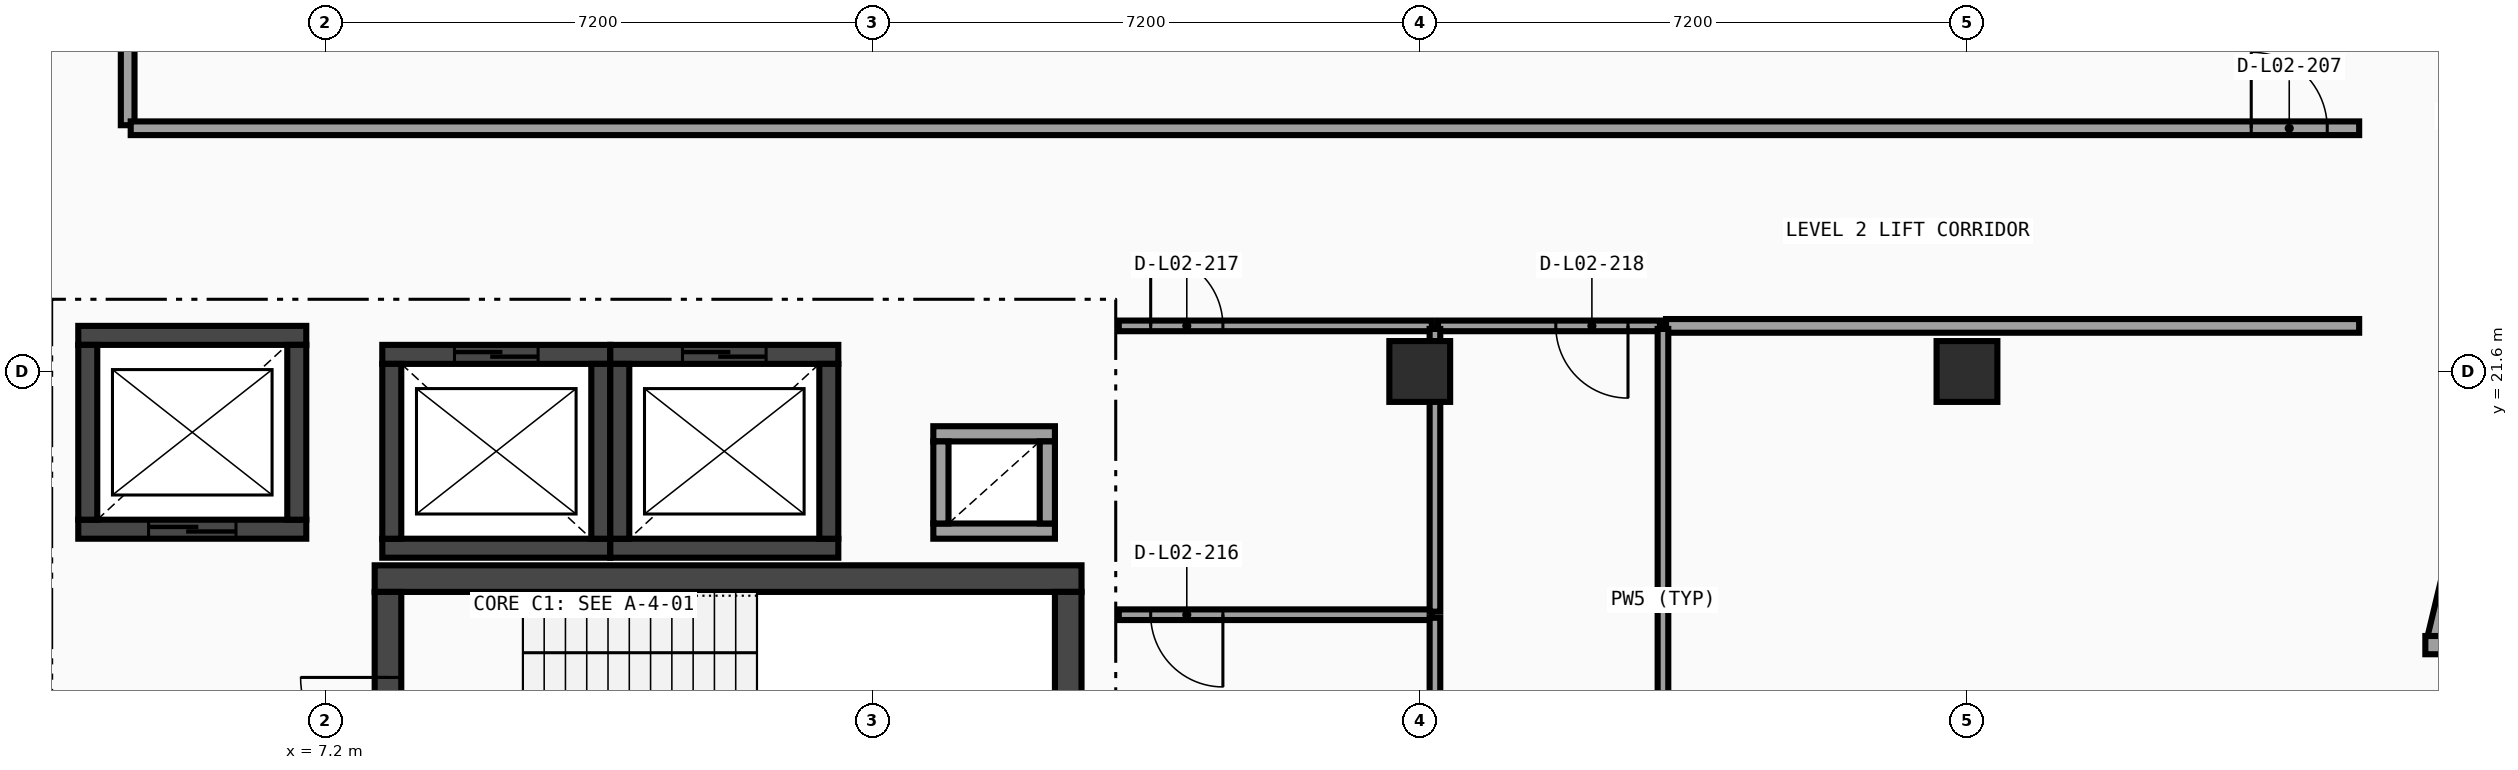
"""IFC4 building model, lengths in metres.
Left out: names, types, materials, properties, quantities, classifications, styles, units other than length and angle.
Written with IfcOpenShell. Run it as: python <this file> out.ifc"""

import sys

from ifc_helpers import new_model, si_unit, direction, frame, frame_2d, origin, origin_2d, place, context, subcontext, project, spatial, rectangle, extrude, element, fill, save


model = new_model("IFC4")
c1 = context("Model", 3, precision=1e-05, world=origin(), true_north=direction((0.0, 1.0)))
c2 = subcontext(c1, "Body", "Model", "MODEL_VIEW")
j1 = project(units=[si_unit("LENGTHUNIT", "METRE"), si_unit("PLANEANGLEUNIT", "RADIAN")], contexts=[c1])
p1 = place(None, origin())
s1 = spatial("IfcSite", under=j1, at=p1, CompositionType="ELEMENT")
p2 = place(p1, origin())
s2 = spatial("IfcBuilding", under=s1, at=p2, CompositionType="ELEMENT")
p3 = place(p2, frame((0.0, 0.0, 10.2)))
s3 = spatial("IfcBuildingStorey", under=s2, at=p3, CompositionType="ELEMENT", Elevation=10.2)
for number, where, z_axis, x_axis in (
    (1, (21.6, 21.6, 0.0), (0.0, 0.0, 1.0), (1.0, 0.0, 0.0)),
    (2, (28.8, 21.6, 0.0), (0.0, 0.0, 1.0), (1.0, 0.0, 0.0)),
):
    element("IfcColumn", number, at=place(p3, frame(where, z_axis=z_axis, x_axis=x_axis)), inside=s3, PredefinedType="COLUMN", context=c2, shape_type="SweptSolid", body=[
        extrude(rectangle(XDim=0.8, YDim=0.8, at=origin_2d()), origin(), (0.0, 0.0, 1.0), 4.5),
    ])
p4 = place(p3, frame((35.84, 21.6, 0.0), z_axis=(0.0, 0.0, 1.0), x_axis=(-0.233480453725, -0.972361495396, 0.0)))
e3 = element("IfcWall", 3, at=p4, inside=s3, PredefinedType="SOLIDWALL", context=c2, shape_type="SweptSolid", body=[
    extrude(rectangle(XDim=3.607, YDim=0.28, at=frame_2d((1.804, 0.0))), origin(), (0.0, 0.0, 1.0), 4.24),
])
p5 = place(p4, frame((0.954, 0.0, 0.8)))
e4 = element("IfcOpeningElement", 4, at=p5, cuts=e3, PredefinedType="OPENING", context=c2, shape_type="SweptSolid", body=[
    extrude(rectangle(XDim=1.7, YDim=1.85, at=frame_2d((0.85, 0.925))), frame((0.0, 0.15, 0.0), z_axis=(0.0, -1.0, 0.0), x_axis=(1.0, 0.0, 0.0)), (0.0, 0.0, 1.0), 0.3),
])
p6 = place(p3, frame((34.831, 18.0, 0.0), z_axis=(0.0, 0.0, 1.0), x_axis=(1.0, 0.0, 0.0)))
e5 = element("IfcWall", 5, at=p6, inside=s3, PredefinedType="SOLIDWALL", context=c2, shape_type="SweptSolid", body=[
    extrude(rectangle(XDim=0.877, YDim=0.24, at=frame_2d((0.438, 0.0))), origin(), (0.0, 0.0, 1.0), 4.24),
])
p7 = place(p3, frame((35.84, 18.0, 0.0), z_axis=(0.0, 0.0, 1.0), x_axis=(-0.233495818898, -0.972357805829, 0.0)))
e6 = element("IfcWall", 6, at=p7, inside=s3, PredefinedType="SOLIDWALL", context=c2, shape_type="SweptSolid", body=[
    extrude(rectangle(XDim=3.607, YDim=0.28, at=frame_2d((1.804, 0.0))), origin(), (0.0, 0.0, 1.0), 4.24),
])
p8 = place(p7, frame((0.954, 0.0, 0.8)))
e7 = element("IfcOpeningElement", 7, at=p8, cuts=e6, PredefinedType="OPENING", context=c2, shape_type="SweptSolid", body=[
    extrude(rectangle(XDim=1.7, YDim=1.85, at=frame_2d((0.85, 0.925))), frame((0.0, 0.15, 0.0), z_axis=(0.0, -1.0, 0.0), x_axis=(1.0, 0.0, 0.0)), (0.0, 0.0, 1.0), 0.3),
])
p9 = place(p3, frame((17.15, 18.875, 0.0), z_axis=(0.0, 0.0, 1.0), x_axis=(-1.0, 0.0, 0.0)))
e8 = element("IfcWall", 8, at=p9, inside=s3, PredefinedType="SHEAR", context=c2, shape_type="SweptSolid", body=[
    extrude(rectangle(XDim=9.3, YDim=0.35, at=frame_2d((4.65, 0.0))), origin(), (0.0, 0.0, 1.0), 4.24),
])
p10 = place(p3, frame((8.025, 18.7, 0.0), z_axis=(0.0, 0.0, 1.0), x_axis=(0.0, -1.0, 0.0)))
e9 = element("IfcWall", 9, at=p10, inside=s3, PredefinedType="SHEAR", context=c2, shape_type="SweptSolid", body=[
    extrude(rectangle(XDim=3.4, YDim=0.35, at=frame_2d((1.7, 0.0))), origin(), (0.0, 0.0, 1.0), 4.24),
])
p11 = place(p10, frame((1.125, 0.0, 0.0)))
e10 = element("IfcOpeningElement", 10, at=p11, cuts=e9, PredefinedType="OPENING", context=c2, shape_type="SweptSolid", body=[
    extrude(rectangle(XDim=1.15, YDim=2.1, at=frame_2d((0.575, 1.05))), frame((0.0, 0.185, 0.0), z_axis=(0.0, -1.0, 0.0), x_axis=(1.0, 0.0, 0.0)), (0.0, 0.0, 1.0), 0.37),
])
p12 = place(p3, frame((16.975, 15.3, 0.0), z_axis=(0.0, 0.0, 1.0), x_axis=(0.0, 1.0, 0.0)))
e11 = element("IfcWall", 11, at=p12, inside=s3, PredefinedType="SHEAR", context=c2, shape_type="SweptSolid", body=[
    extrude(rectangle(XDim=3.4, YDim=0.35, at=frame_2d((1.7, 0.0))), origin(), (0.0, 0.0, 1.0), 4.24),
])
p13 = place(p3, frame((3.95, 19.525, 0.0), z_axis=(0.0, 0.0, 1.0), x_axis=(1.0, 0.0, 0.0)))
e12 = element("IfcWall", 12, at=p13, inside=s3, PredefinedType="SHEAR", context=c2, shape_type="SweptSolid", body=[
    extrude(rectangle(XDim=3.0, YDim=0.25, at=frame_2d((1.5, 0.0))), origin(), (0.0, 0.0, 1.0), 4.24),
])
p14 = place(p13, frame((0.925, 0.0, 0.0)))
e13 = element("IfcOpeningElement", 13, at=p14, cuts=e12, PredefinedType="OPENING", context=c2, shape_type="SweptSolid", body=[
    extrude(rectangle(XDim=1.15, YDim=2.1, at=frame_2d((0.575, 1.05))), frame((0.0, 0.135, 0.0), z_axis=(0.0, -1.0, 0.0), x_axis=(1.0, 0.0, 0.0)), (0.0, 0.0, 1.0), 0.27),
])
p15 = place(p3, frame((6.95, 22.075, 0.0), z_axis=(0.0, 0.0, 1.0), x_axis=(-1.0, 0.0, 0.0)))
e14 = element("IfcWall", 14, at=p15, inside=s3, PredefinedType="SHEAR", context=c2, shape_type="SweptSolid", body=[
    extrude(rectangle(XDim=3.0, YDim=0.25, at=frame_2d((1.5, 0.0))), origin(), (0.0, 0.0, 1.0), 4.24),
])
for number, where, z_axis, x_axis in (
    (15, (4.075, 21.95, 0.0), (0.0, 0.0, 1.0), (0.0, -1.0, 0.0)),
    (16, (6.825, 19.65, 0.0), (0.0, 0.0, 1.0), (0.0, 1.0, 0.0)),
):
    element("IfcWall", number, at=place(p3, frame(where, z_axis=z_axis, x_axis=x_axis)), inside=s3, PredefinedType="SHEAR", context=c2, shape_type="SweptSolid", body=[
        extrude(rectangle(XDim=2.3, YDim=0.25, at=frame_2d((1.15, 0.0))), origin(), (0.0, 0.0, 1.0), 4.24),
    ])
p16 = place(p3, frame((7.95, 19.275, 0.0), z_axis=(0.0, 0.0, 1.0), x_axis=(1.0, 0.0, 0.0)))
e17 = element("IfcWall", 17, at=p16, inside=s3, PredefinedType="SHEAR", context=c2, shape_type="SweptSolid", body=[
    extrude(rectangle(XDim=3.0, YDim=0.25, at=frame_2d((1.5, 0.0))), origin(), (0.0, 0.0, 1.0), 4.24),
])
p17 = place(p3, frame((10.95, 21.825, 0.0), z_axis=(0.0, 0.0, 1.0), x_axis=(-1.0, 0.0, 0.0)))
e18 = element("IfcWall", 18, at=p17, inside=s3, PredefinedType="SHEAR", context=c2, shape_type="SweptSolid", body=[
    extrude(rectangle(XDim=3.0, YDim=0.25, at=frame_2d((1.5, 0.0))), origin(), (0.0, 0.0, 1.0), 4.24),
])
p18 = place(p17, frame((0.95, 0.0, 0.0)))
e19 = element("IfcOpeningElement", 19, at=p18, cuts=e18, PredefinedType="OPENING", context=c2, shape_type="SweptSolid", body=[
    extrude(rectangle(XDim=1.1, YDim=2.1, at=frame_2d((0.55, 1.05))), frame((0.0, 0.135, 0.0), z_axis=(0.0, -1.0, 0.0), x_axis=(1.0, 0.0, 0.0)), (0.0, 0.0, 1.0), 0.27),
])
for number, where, z_axis, x_axis in (
    (20, (8.075, 21.7, 0.0), (0.0, 0.0, 1.0), (0.0, -1.0, 0.0)),
    (21, (10.825, 19.4, 0.0), (0.0, 0.0, 1.0), (0.0, 1.0, 0.0)),
):
    element("IfcWall", number, at=place(p3, frame(where, z_axis=z_axis, x_axis=x_axis)), inside=s3, PredefinedType="SHEAR", context=c2, shape_type="SweptSolid", body=[
        extrude(rectangle(XDim=2.3, YDim=0.25, at=frame_2d((1.15, 0.0))), origin(), (0.0, 0.0, 1.0), 4.24),
    ])
p19 = place(p3, frame((10.95, 19.275, 0.0), z_axis=(0.0, 0.0, 1.0), x_axis=(1.0, 0.0, 0.0)))
e22 = element("IfcWall", 22, at=p19, inside=s3, PredefinedType="SHEAR", context=c2, shape_type="SweptSolid", body=[
    extrude(rectangle(XDim=3.0, YDim=0.25, at=frame_2d((1.5, 0.0))), origin(), (0.0, 0.0, 1.0), 4.24),
])
p20 = place(p3, frame((13.95, 21.825, 0.0), z_axis=(0.0, 0.0, 1.0), x_axis=(-1.0, 0.0, 0.0)))
e23 = element("IfcWall", 23, at=p20, inside=s3, PredefinedType="SHEAR", context=c2, shape_type="SweptSolid", body=[
    extrude(rectangle(XDim=3.0, YDim=0.25, at=frame_2d((1.5, 0.0))), origin(), (0.0, 0.0, 1.0), 4.24),
])
p21 = place(p20, frame((0.95, 0.0, 0.0)))
e24 = element("IfcOpeningElement", 24, at=p21, cuts=e23, PredefinedType="OPENING", context=c2, shape_type="SweptSolid", body=[
    extrude(rectangle(XDim=1.1, YDim=2.1, at=frame_2d((0.55, 1.05))), frame((0.0, 0.135, 0.0), z_axis=(0.0, -1.0, 0.0), x_axis=(1.0, 0.0, 0.0)), (0.0, 0.0, 1.0), 0.27),
])
for number, where, z_axis, x_axis in (
    (25, (11.075, 21.7, 0.0), (0.0, 0.0, 1.0), (0.0, -1.0, 0.0)),
    (26, (13.825, 19.4, 0.0), (0.0, 0.0, 1.0), (0.0, 1.0, 0.0)),
):
    element("IfcWall", number, at=place(p3, frame(where, z_axis=z_axis, x_axis=x_axis)), inside=s3, PredefinedType="SHEAR", context=c2, shape_type="SweptSolid", body=[
        extrude(rectangle(XDim=2.3, YDim=0.25, at=frame_2d((1.15, 0.0))), origin(), (0.0, 0.0, 1.0), 4.24),
    ])
for number, where, z_axis, x_axis in (
    (27, (15.2, 19.5, 0.0), (0.0, 0.0, 1.0), (1.0, 0.0, 0.0)),
    (28, (16.8, 20.78, 0.0), (0.0, 0.0, 1.0), (-1.0, 0.0, 0.0)),
):
    element("IfcWall", number, at=place(p3, frame(where, z_axis=z_axis, x_axis=x_axis)), inside=s3, PredefinedType="SOLIDWALL", context=c2, shape_type="SweptSolid", body=[
        extrude(rectangle(XDim=1.6, YDim=0.2, at=frame_2d((0.8, 0.0))), origin(), (0.0, 0.0, 1.0), 4.24),
    ])
for number, where, z_axis, x_axis in (
    (29, (15.3, 20.68, 0.0), (0.0, 0.0, 1.0), (0.0, -1.0, 0.0)),
    (30, (16.7, 19.6, 0.0), (0.0, 0.0, 1.0), (0.0, 1.0, 0.0)),
):
    element("IfcWall", number, at=place(p3, frame(where, z_axis=z_axis, x_axis=x_axis)), inside=s3, PredefinedType="SOLIDWALL", context=c2, shape_type="SweptSolid", body=[
        extrude(rectangle(XDim=1.08, YDim=0.2, at=frame_2d((0.54, 0.0))), origin(), (0.0, 0.0, 1.0), 4.24),
    ])
p22 = place(p3, frame((4.6, 24.84, 0.0), z_axis=(0.0, 0.0, 1.0), x_axis=(0.0, 1.0, 0.0)))
e31 = element("IfcWall", 31, at=p22, inside=s3, PredefinedType="PARTITIONING", context=c2, shape_type="SweptSolid", body=[
    extrude(rectangle(XDim=10.22, YDim=0.18, at=frame_2d((5.11, 0.0))), origin(), (0.0, 0.0, 1.0), 3.618),
])
p23 = place(p22, frame((6.705, 0.0, 0.0)))
e32 = element("IfcOpeningElement", 32, at=p23, cuts=e31, PredefinedType="OPENING", context=c2, shape_type="SweptSolid", body=[
    extrude(rectangle(XDim=1.0, YDim=2.1, at=frame_2d((0.5, 1.05))), frame((0.0, 0.1, 0.0), z_axis=(0.0, -1.0, 0.0), x_axis=(1.0, 0.0, 0.0)), (0.0, 0.0, 1.0), 0.2),
])
p24 = place(p3, frame((24.84, 22.2, 0.0), z_axis=(0.0, 0.0, 1.0), x_axis=(1.0, 0.0, 0.0)))
e33 = element("IfcWall", 33, at=p24, inside=s3, PredefinedType="PARTITIONING", context=c2, shape_type="SweptSolid", body=[
    extrude(rectangle(XDim=9.12, YDim=0.18, at=frame_2d((4.56, 0.0))), origin(), (0.0, 0.0, 1.0), 3.451),
])
p25 = place(p3, frame((4.64, 24.8, 0.0), z_axis=(0.0, 0.0, 1.0), x_axis=(1.0, 0.0, 0.0)))
e34 = element("IfcWall", 34, at=p25, inside=s3, PredefinedType="PARTITIONING", context=c2, shape_type="SweptSolid", body=[
    extrude(rectangle(XDim=29.32, YDim=0.18, at=frame_2d((14.66, 0.0))), origin(), (0.0, 0.0, 1.0), 3.451),
])
p26 = place(p25, frame((27.9, 0.0, 0.0)))
e35 = element("IfcOpeningElement", 35, at=p26, cuts=e34, PredefinedType="OPENING", context=c2, shape_type="SweptSolid", body=[
    extrude(rectangle(XDim=1.0, YDim=2.1, at=frame_2d((0.5, 1.05))), frame((0.0, 0.1, 0.0), z_axis=(0.0, -1.0, 0.0), x_axis=(1.0, 0.0, 0.0)), (0.0, 0.0, 1.0), 0.2),
])
p27 = place(p3, frame((17.64, 22.2, 0.0), z_axis=(0.0, 0.0, 1.0), x_axis=(1.0, 0.0, 0.0)))
e36 = element("IfcWall", 36, at=p27, inside=s3, PredefinedType="PARTITIONING", context=c2, shape_type="SweptSolid", body=[
    extrude(rectangle(XDim=4.12, YDim=0.14, at=frame_2d((2.06, 0.0))), origin(), (0.0, 0.0, 1.0), 3.451),
])
p28 = place(p27, frame((0.42, 0.0, 0.0)))
e37 = element("IfcOpeningElement", 37, at=p28, cuts=e36, PredefinedType="OPENING", context=c2, shape_type="SweptSolid", body=[
    extrude(rectangle(XDim=0.95, YDim=2.08, at=frame_2d((0.475, 1.04))), frame((0.0, 0.08, 0.0), z_axis=(0.0, -1.0, 0.0), x_axis=(1.0, 0.0, 0.0)), (0.0, 0.0, 1.0), 0.16),
])
p29 = place(p3, frame((21.84, 22.2, 0.0), z_axis=(0.0, 0.0, 1.0), x_axis=(1.0, 0.0, 0.0)))
e38 = element("IfcWall", 38, at=p29, inside=s3, PredefinedType="PARTITIONING", context=c2, shape_type="SweptSolid", body=[
    extrude(rectangle(XDim=2.92, YDim=0.14, at=frame_2d((1.46, 0.0))), origin(), (0.0, 0.0, 1.0), 4.24),
])
p30 = place(p29, frame((1.55, 0.0, 0.0)))
e39 = element("IfcOpeningElement", 39, at=p30, cuts=e38, PredefinedType="OPENING", context=c2, shape_type="SweptSolid", body=[
    extrude(rectangle(XDim=0.95, YDim=2.08, at=frame_2d((0.475, 1.04))), frame((0.0, 0.08, 0.0), z_axis=(0.0, -1.0, 0.0), x_axis=(1.0, 0.0, 0.0)), (0.0, 0.0, 1.0), 0.16),
])
p31 = place(p3, frame((24.8, 15.04, 0.0), z_axis=(0.0, 0.0, 1.0), x_axis=(0.0, 1.0, 0.0)))
e40 = element("IfcWall", 40, at=p31, inside=s3, PredefinedType="PARTITIONING", context=c2, shape_type="SweptSolid", body=[
    extrude(rectangle(XDim=7.12, YDim=0.14, at=frame_2d((3.56, 0.0))), origin(), (0.0, 0.0, 1.0), 3.618),
])
p32 = place(p3, frame((17.64, 18.4, 0.0), z_axis=(0.0, 0.0, 1.0), x_axis=(1.0, 0.0, 0.0)))
e41 = element("IfcWall", 41, at=p32, inside=s3, PredefinedType="PARTITIONING", context=c2, shape_type="SweptSolid", body=[
    extrude(rectangle(XDim=4.12, YDim=0.14, at=frame_2d((2.06, 0.0))), origin(), (0.0, 0.0, 1.0), 4.24),
])
p33 = place(p32, frame((0.42, 0.0, 0.0)))
e42 = element("IfcOpeningElement", 42, at=p33, cuts=e41, PredefinedType="OPENING", context=c2, shape_type="SweptSolid", body=[
    extrude(rectangle(XDim=0.95, YDim=2.08, at=frame_2d((0.475, 1.04))), frame((0.0, 0.08, 0.0), z_axis=(0.0, -1.0, 0.0), x_axis=(1.0, 0.0, 0.0)), (0.0, 0.0, 1.0), 0.16),
])
p34 = place(p3, frame((21.8, 15.39, 0.0), z_axis=(0.0, 0.0, 1.0), x_axis=(0.0, 1.0, 0.0)))
e43 = element("IfcWall", 43, at=p34, inside=s3, PredefinedType="PARTITIONING", context=c2, shape_type="SweptSolid", body=[
    extrude(rectangle(XDim=2.97, YDim=0.14, at=frame_2d((1.485, 0.0))), origin(), (0.0, 0.0, 1.0), 4.24),
])
p35 = place(p3, frame((21.8, 18.44, 0.0), z_axis=(0.0, 0.0, 1.0), x_axis=(0.0, 1.0, 0.0)))
e44 = element("IfcWall", 44, at=p35, inside=s3, PredefinedType="PARTITIONING", context=c2, shape_type="SweptSolid", body=[
    extrude(rectangle(XDim=3.72, YDim=0.14, at=frame_2d((1.86, 0.0))), origin(), (0.0, 0.0, 1.0), 3.451),
])
p36 = place(p11, frame((1.15, 0.0, 0.0), z_axis=(0.0, 0.0, 1.0), x_axis=(-1.0, 0.0, 0.0)))
e45 = element("IfcDoor", 45, at=p36, inside=s3, OperationType="SINGLE_SWING_RIGHT", PredefinedType="DOOR", context=c2, shape_type="SweptSolid", body=[
    extrude(rectangle(XDim=1.15, YDim=2.1, at=frame_2d((0.575, 1.05))), frame((0.0, 0.025, 0.0), z_axis=(0.0, -1.0, 0.0), x_axis=(1.0, 0.0, 0.0)), (0.0, 0.0, 1.0), 0.05),
])
fill(e10, e45)
p37 = place(p14, origin())
e46 = element("IfcDoor", 46, at=p37, inside=s3, OperationType="SLIDING_TO_RIGHT", PredefinedType="DOOR", context=c2, shape_type="SweptSolid", body=[
    extrude(rectangle(XDim=1.15, YDim=2.1, at=frame_2d((0.575, 1.05))), frame((0.0, 0.025, 0.0), z_axis=(0.0, -1.0, 0.0), x_axis=(1.0, 0.0, 0.0)), (0.0, 0.0, 1.0), 0.05),
])
fill(e13, e46)
p38 = place(p18, origin())
e47 = element("IfcDoor", 47, at=p38, inside=s3, OperationType="SLIDING_TO_LEFT", PredefinedType="DOOR", context=c2, shape_type="SweptSolid", body=[
    extrude(rectangle(XDim=1.1, YDim=2.1, at=frame_2d((0.55, 1.05))), frame((0.0, 0.025, 0.0), z_axis=(0.0, -1.0, 0.0), x_axis=(1.0, 0.0, 0.0)), (0.0, 0.0, 1.0), 0.05),
])
fill(e19, e47)
p39 = place(p21, origin())
e48 = element("IfcDoor", 48, at=p39, inside=s3, OperationType="SLIDING_TO_LEFT", PredefinedType="DOOR", context=c2, shape_type="SweptSolid", body=[
    extrude(rectangle(XDim=1.1, YDim=2.1, at=frame_2d((0.55, 1.05))), frame((0.0, 0.025, 0.0), z_axis=(0.0, -1.0, 0.0), x_axis=(1.0, 0.0, 0.0)), (0.0, 0.0, 1.0), 0.05),
])
fill(e24, e48)
p40 = place(p26, origin())
e49 = element("IfcDoor", 49, at=p40, inside=s3, OperationType="SINGLE_SWING_LEFT", PredefinedType="DOOR", context=c2, shape_type="SweptSolid", body=[
    extrude(rectangle(XDim=1.0, YDim=2.1, at=frame_2d((0.5, 1.05))), frame((0.0, 0.025, 0.0), z_axis=(0.0, -1.0, 0.0), x_axis=(1.0, 0.0, 0.0)), (0.0, 0.0, 1.0), 0.05),
])
fill(e35, e49)
p41 = place(p33, origin())
e50 = element("IfcDoor", 50, at=p41, inside=s3, OperationType="SINGLE_SWING_RIGHT", PredefinedType="DOOR", context=c2, shape_type="SweptSolid", body=[
    extrude(rectangle(XDim=0.95, YDim=2.08, at=frame_2d((0.475, 1.04))), frame((0.0, 0.025, 0.0), z_axis=(0.0, -1.0, 0.0), x_axis=(1.0, 0.0, 0.0)), (0.0, 0.0, 1.0), 0.05),
])
fill(e42, e50)
p42 = place(p28, origin())
e51 = element("IfcDoor", 51, at=p42, inside=s3, OperationType="SINGLE_SWING_LEFT", PredefinedType="DOOR", context=c2, shape_type="SweptSolid", body=[
    extrude(rectangle(XDim=0.95, YDim=2.08, at=frame_2d((0.475, 1.04))), frame((0.0, 0.025, 0.0), z_axis=(0.0, -1.0, 0.0), x_axis=(1.0, 0.0, 0.0)), (0.0, 0.0, 1.0), 0.05),
])
fill(e37, e51)
p43 = place(p30, origin())
e52 = element("IfcDoor", 52, at=p43, inside=s3, OperationType="SINGLE_SWING_RIGHT", PredefinedType="DOOR", context=c2, shape_type="SweptSolid", body=[
    extrude(rectangle(XDim=0.95, YDim=2.08, at=frame_2d((0.475, 1.04))), frame((0.0, 0.025, 0.0), z_axis=(0.0, -1.0, 0.0), x_axis=(1.0, 0.0, 0.0)), (0.0, 0.0, 1.0), 0.05),
])
fill(e39, e52)
save(model, sys.argv[1])
